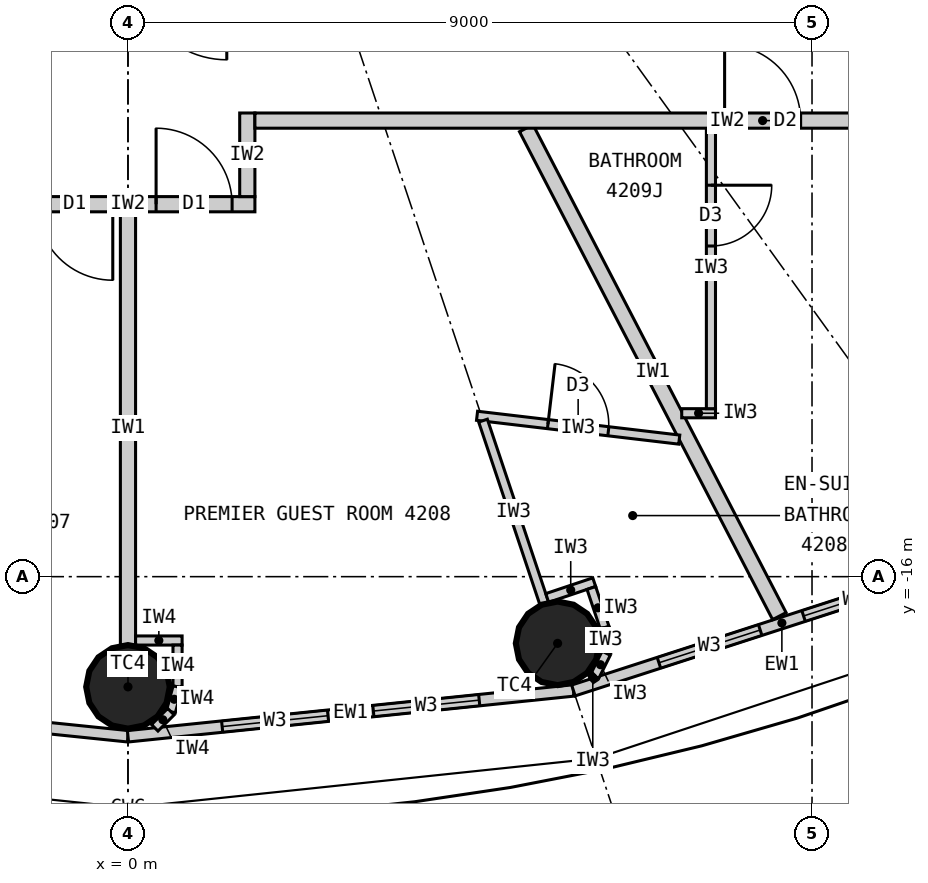
"""IFC4 building model, lengths in metres.
Left out: names, types, materials, properties, quantities, classifications, styles, units other than length and angle.
Written with IfcOpenShell. Run it as: python <this file> out.ifc"""

import sys

from ifc_helpers import new_model, si_unit, direction, frame, frame_2d, origin, origin_2d, place, context, subcontext, project, spatial, rectangle, circle, extrude, element, fill, save


model = new_model("IFC4")
c1 = context("Model", 3, precision=1e-05, world=origin(), true_north=direction((0.0, 1.0)))
c2 = subcontext(c1, "Body", "Model", "MODEL_VIEW")
j1 = project(units=[si_unit("LENGTHUNIT", "METRE"), si_unit("PLANEANGLEUNIT", "RADIAN")], contexts=[c1])
p1 = place(None, origin())
s1 = spatial("IfcSite", under=j1, at=p1, CompositionType="ELEMENT")
p2 = place(p1, origin())
s2 = spatial("IfcBuilding", under=s1, at=p2, CompositionType="ELEMENT")
p3 = place(p2, frame((0.0, 0.0, 159.9)))
s3 = spatial("IfcBuildingStorey", under=s2, at=p3, CompositionType="ELEMENT", Elevation=159.9)
for number, where, z_axis, x_axis in (
    (1, (0.0, -17.45, 0.0), (0.0, 0.0, 1.0), (1.0, 0.0, 0.0)),
    (2, (5.653, -16.877, 0.0), (0.0, 0.0, 1.0), (1.0, 0.0, 0.0)),
):
    element("IfcColumn", number, at=place(p3, frame(where, z_axis=z_axis, x_axis=x_axis)), inside=s3, PredefinedType="COLUMN", context=c2, shape_type="SweptSolid", body=[
        extrude(circle(Radius=0.55, at=origin_2d()), origin(), (0.0, 0.0, 1.0), 3.3),
    ])
p4 = place(p3, frame((-5.86, -17.497, 0.0), z_axis=(0.0, 0.0, 1.0), x_axis=(0.994751738032, -0.102318032045, 0.0)))
e3 = element("IfcWall", 3, at=p4, inside=s3, PredefinedType="ELEMENTEDWALL", context=c2, shape_type="SweptSolid", body=[
    extrude(rectangle(XDim=5.891, YDim=0.15, at=frame_2d((2.946, 0.0))), origin(), (0.0, 0.0, 1.0), 3.12),
])
p5 = place(p4, frame((1.246, 0.0, 0.9)))
e4 = element("IfcOpeningElement", 4, at=p5, cuts=e3, PredefinedType="OPENING", context=c2, shape_type="SweptSolid", body=[
    extrude(rectangle(XDim=1.4, YDim=1.9, at=frame_2d((0.7, 0.95))), frame((0.0, 0.085, 0.0), z_axis=(0.0, -1.0, 0.0), x_axis=(1.0, 0.0, 0.0)), (0.0, 0.0, 1.0), 0.17),
])
p6 = place(p4, frame((3.246, 0.0, 0.9)))
e5 = element("IfcOpeningElement", 5, at=p6, cuts=e3, PredefinedType="OPENING", context=c2, shape_type="SweptSolid", body=[
    extrude(rectangle(XDim=1.4, YDim=1.9, at=frame_2d((0.7, 0.95))), frame((0.0, 0.085, 0.0), z_axis=(0.0, -1.0, 0.0), x_axis=(1.0, 0.0, 0.0)), (0.0, 0.0, 1.0), 0.17),
])
p7 = place(p3, frame((0.0, -18.1, 0.0), z_axis=(0.0, 0.0, 1.0), x_axis=(0.994751738032, 0.102318032045, 0.0)))
e6 = element("IfcWall", 6, at=p7, inside=s3, PredefinedType="ELEMENTEDWALL", context=c2, shape_type="SweptSolid", body=[
    extrude(rectangle(XDim=5.891, YDim=0.15, at=frame_2d((2.946, 0.0))), origin(), (0.0, 0.0, 1.0), 3.12),
])
p8 = place(p7, frame((1.246, 0.0, 0.9)))
e7 = element("IfcOpeningElement", 7, at=p8, cuts=e6, PredefinedType="OPENING", context=c2, shape_type="SweptSolid", body=[
    extrude(rectangle(XDim=1.4, YDim=1.9, at=frame_2d((0.7, 0.95))), frame((0.0, 0.085, 0.0), z_axis=(0.0, -1.0, 0.0), x_axis=(1.0, 0.0, 0.0)), (0.0, 0.0, 1.0), 0.17),
])
p9 = place(p7, frame((3.246, 0.0, 0.9)))
e8 = element("IfcOpeningElement", 8, at=p9, cuts=e6, PredefinedType="OPENING", context=c2, shape_type="SweptSolid", body=[
    extrude(rectangle(XDim=1.4, YDim=1.9, at=frame_2d((0.7, 0.95))), frame((0.0, 0.085, 0.0), z_axis=(0.0, -1.0, 0.0), x_axis=(1.0, 0.0, 0.0)), (0.0, 0.0, 1.0), 0.17),
])
p10 = place(p3, frame((5.86, -17.497, 0.0), z_axis=(0.0, 0.0, 1.0), x_axis=(0.951432482129, 0.307857486429, 0.0)))
e9 = element("IfcWall", 9, at=p10, inside=s3, PredefinedType="ELEMENTEDWALL", context=c2, shape_type="SweptSolid", body=[
    extrude(rectangle(XDim=5.766, YDim=0.15, at=frame_2d((2.883, 0.0))), origin(), (0.0, 0.0, 1.0), 3.12),
])
p11 = place(p10, frame((1.183, 0.0, 0.9)))
e10 = element("IfcOpeningElement", 10, at=p11, cuts=e9, PredefinedType="OPENING", context=c2, shape_type="SweptSolid", body=[
    extrude(rectangle(XDim=1.4, YDim=1.9, at=frame_2d((0.7, 0.95))), frame((0.0, 0.085, 0.0), z_axis=(0.0, -1.0, 0.0), x_axis=(1.0, 0.0, 0.0)), (0.0, 0.0, 1.0), 0.17),
])
p12 = place(p10, frame((3.183, 0.0, 0.9)))
e11 = element("IfcOpeningElement", 11, at=p12, cuts=e9, PredefinedType="OPENING", context=c2, shape_type="SweptSolid", body=[
    extrude(rectangle(XDim=1.4, YDim=1.9, at=frame_2d((0.7, 0.95))), frame((0.0, 0.085, 0.0), z_axis=(0.0, -1.0, 0.0), x_axis=(1.0, 0.0, 0.0)), (0.0, 0.0, 1.0), 0.17),
])
p13 = place(p3, frame((0.0, -11.2, 0.0), z_axis=(0.0, 0.0, 1.0), x_axis=(0.0, -1.0, 0.0)))
e12 = element("IfcWall", 12, at=p13, inside=s3, PredefinedType="PARTITIONING", context=c2, shape_type="SweptSolid", body=[
    extrude(rectangle(XDim=5.7, YDim=0.2, at=frame_2d((2.85, 0.0))), origin(), (0.0, 0.0, 1.0), 2.42),
])
p14 = place(p3, frame((5.24, -10.1, 0.0), z_axis=(0.0, 0.0, 1.0), x_axis=(0.460532965373, -0.887642601391, 0.0)))
e13 = element("IfcWall", 13, at=p14, inside=s3, PredefinedType="PARTITIONING", context=c2, shape_type="SweptSolid", body=[
    extrude(rectangle(XDim=7.231, YDim=0.2, at=frame_2d((3.616, 0.0))), origin(), (0.0, 0.0, 1.0), 3.12),
])
p15 = place(p3, frame((1.67, -11.1, 0.0), z_axis=(0.0, 0.0, 1.0), x_axis=(-1.0, 0.0, 0.0)))
e14 = element("IfcWall", 14, at=p15, inside=s3, PredefinedType="PARTITIONING", context=c2, shape_type="SweptSolid", body=[
    extrude(rectangle(XDim=3.34, YDim=0.2, at=frame_2d((1.67, 0.0))), origin(), (0.0, 0.0, 1.0), 3.12),
])
p16 = place(p15, frame((1.87, 0.0, 0.0)))
e15 = element("IfcOpeningElement", 15, at=p16, cuts=e14, PredefinedType="OPENING", context=c2, shape_type="SweptSolid", body=[
    extrude(rectangle(XDim=1.0, YDim=2.2, at=frame_2d((0.5, 1.1))), frame((0.0, 0.11, 0.0), z_axis=(0.0, -1.0, 0.0), x_axis=(1.0, 0.0, 0.0)), (0.0, 0.0, 1.0), 0.22),
])
p17 = place(p15, frame((0.3, 0.0, 0.0)))
e16 = element("IfcOpeningElement", 16, at=p17, cuts=e14, PredefinedType="OPENING", context=c2, shape_type="SweptSolid", body=[
    extrude(rectangle(XDim=1.0, YDim=2.2, at=frame_2d((0.5, 1.1))), frame((0.0, 0.11, 0.0), z_axis=(0.0, -1.0, 0.0), x_axis=(1.0, 0.0, 0.0)), (0.0, 0.0, 1.0), 0.22),
])
p18 = place(p3, frame((1.57, -9.9, 0.0), z_axis=(0.0, 0.0, 1.0), x_axis=(0.0, -1.0, 0.0)))
e17 = element("IfcWall", 17, at=p18, inside=s3, PredefinedType="PARTITIONING", context=c2, shape_type="SweptSolid", body=[
    extrude(rectangle(XDim=1.1, YDim=0.2, at=frame_2d((0.55, 0.0))), origin(), (0.0, 0.0, 1.0), 3.12),
])
p19 = place(p3, frame((7.253, -14.197, 0.0), z_axis=(0.0, 0.0, 1.0), x_axis=(-0.993128188393, 0.117031625725, 0.0)))
e18 = element("IfcWall", 18, at=p19, inside=s3, PredefinedType="PARTITIONING", context=c2, shape_type="SweptSolid", body=[
    extrude(rectangle(XDim=2.678, YDim=0.12, at=frame_2d((1.339, 0.0))), origin(), (0.0, 0.0, 1.0), 3.12),
])
p20 = place(p19, frame((0.939, 0.0, 0.0)))
e19 = element("IfcOpeningElement", 19, at=p20, cuts=e18, PredefinedType="OPENING", context=c2, shape_type="SweptSolid", body=[
    extrude(rectangle(XDim=0.8, YDim=2.1, at=frame_2d((0.4, 1.05))), frame((0.0, 0.07, 0.0), z_axis=(0.0, -1.0, 0.0), x_axis=(1.0, 0.0, 0.0)), (0.0, 0.0, 1.0), 0.14),
])
p21 = place(p3, frame((4.671, -13.948, 0.0), z_axis=(0.0, 0.0, 1.0), x_axis=(0.317669167093, -0.948201613729, 0.0)))
e20 = element("IfcWall", 20, at=p21, inside=s3, PredefinedType="PARTITIONING", context=c2, shape_type="SweptSolid", body=[
    extrude(rectangle(XDim=2.54, YDim=0.12, at=frame_2d((1.27, 0.0))), origin(), (0.0, 0.0, 1.0), 2.42),
])
p22 = place(p3, frame((5.516, -16.28, 0.0), z_axis=(0.0, 0.0, 1.0), x_axis=(0.948157944392, 0.317799484717, 0.0)))
e21 = element("IfcWall", 21, at=p22, inside=s3, PredefinedType="PARTITIONING", context=c2, shape_type="SweptSolid", body=[
    extrude(rectangle(XDim=0.652, YDim=0.12, at=frame_2d((0.326, 0.0))), origin(), (0.0, 0.0, 1.0), 3.12),
])
p23 = place(p3, frame((6.097, -16.149, 0.0), z_axis=(0.0, 0.0, 1.0), x_axis=(0.317292604854, -0.948327687514, 0.0)))
e22 = element("IfcWall", 22, at=p23, inside=s3, PredefinedType="PARTITIONING", context=c2, shape_type="SweptSolid", body=[
    extrude(rectangle(XDim=0.55, YDim=0.12, at=frame_2d((0.275, 0.0))), origin(), (0.0, 0.0, 1.0), 3.12),
])
for number, where, z_axis, x_axis in (
    (23, (6.271, -16.67, 0.0), (0.0, 0.0, 1.0), (0.061, -0.998, 0.0)),
    (24, (6.292, -17.007, 0.0), (0.0, 0.0, 1.0), (-0.445, -0.895, 0.0)),
):
    element("IfcWall", number, at=place(p3, frame(where, z_axis=z_axis, x_axis=x_axis)), inside=s3, PredefinedType="PARTITIONING", context=c2, shape_type="SweptSolid", body=[
        extrude(rectangle(XDim=0.338, YDim=0.12, at=frame_2d((0.169, 0.0))), origin(), (0.0, 0.0, 1.0), 3.12),
    ])
p24 = place(p3, frame((6.142, -17.31, 0.0), z_axis=(0.0, 0.0, 1.0), x_axis=(-0.835039693181, -0.550189704386, 0.0)))
e25 = element("IfcWall", 25, at=p24, inside=s3, PredefinedType="PARTITIONING", context=c2, shape_type="SweptSolid", body=[
    extrude(rectangle(XDim=0.062, YDim=0.12, at=frame_2d((0.031, 0.0))), origin(), (0.0, 0.0, 1.0), 3.12),
])
p25 = place(p3, frame((7.286, -13.85, 0.0), z_axis=(0.0, 0.0, 1.0), x_axis=(1.0, 0.0, 0.0)))
e26 = element("IfcWall", 26, at=p25, inside=s3, PredefinedType="PARTITIONING", context=c2, shape_type="SweptSolid", body=[
    extrude(rectangle(XDim=0.444, YDim=0.12, at=frame_2d((0.222, 0.0))), origin(), (0.0, 0.0, 1.0), 3.12),
])
p26 = place(p3, frame((7.67, -10.1, 0.0), z_axis=(0.0, 0.0, 1.0), x_axis=(0.0, -1.0, 0.0)))
e27 = element("IfcWall", 27, at=p26, inside=s3, PredefinedType="PARTITIONING", context=c2, shape_type="SweptSolid", body=[
    extrude(rectangle(XDim=3.69, YDim=0.12, at=frame_2d((1.845, 0.0))), origin(), (0.0, 0.0, 1.0), 3.12),
])
p27 = place(p26, frame((0.75, 0.0, 0.0)))
e28 = element("IfcOpeningElement", 28, at=p27, cuts=e27, PredefinedType="OPENING", context=c2, shape_type="SweptSolid", body=[
    extrude(rectangle(XDim=0.8, YDim=2.1, at=frame_2d((0.4, 1.05))), frame((0.0, 0.07, 0.0), z_axis=(0.0, -1.0, 0.0), x_axis=(1.0, 0.0, 0.0)), (0.0, 0.0, 1.0), 0.14),
])
p28 = place(p3, frame((14.1, -10.0, 0.0), z_axis=(0.0, 0.0, 1.0), x_axis=(-1.0, 0.0, 0.0)))
e29 = element("IfcWall", 29, at=p28, inside=s3, PredefinedType="PARTITIONING", context=c2, shape_type="SweptSolid", body=[
    extrude(rectangle(XDim=12.43, YDim=0.2, at=frame_2d((6.215, 0.0))), origin(), (0.0, 0.0, 1.0), 3.12),
])
p29 = place(p28, frame((5.25, 0.0, 0.0)))
e30 = element("IfcOpeningElement", 30, at=p29, cuts=e29, PredefinedType="OPENING", context=c2, shape_type="SweptSolid", body=[
    extrude(rectangle(XDim=1.0, YDim=2.2, at=frame_2d((0.5, 1.1))), frame((0.0, 0.11, 0.0), z_axis=(0.0, -1.0, 0.0), x_axis=(1.0, 0.0, 0.0)), (0.0, 0.0, 1.0), 0.22),
])
p30 = place(p3, frame((0.1, -16.84, 0.0), z_axis=(0.0, 0.0, 1.0), x_axis=(1.0, 0.0, 0.0)))
e31 = element("IfcWall", 31, at=p30, inside=s3, PredefinedType="PARTITIONING", context=c2, shape_type="SweptSolid", body=[
    extrude(rectangle(XDim=0.612, YDim=0.12, at=frame_2d((0.306, 0.0))), origin(), (0.0, 0.0, 1.0), 3.12),
])
p31 = place(p3, frame((0.652, -16.9, 0.0), z_axis=(0.0, 0.0, 1.0), x_axis=(0.0, -1.0, 0.0)))
e32 = element("IfcWall", 32, at=p31, inside=s3, PredefinedType="PARTITIONING", context=c2, shape_type="SweptSolid", body=[
    extrude(rectangle(XDim=0.55, YDim=0.12, at=frame_2d((0.275, 0.0))), origin(), (0.0, 0.0, 1.0), 3.12),
])
p32 = place(p3, frame((0.652, -17.45, 0.0), z_axis=(0.0, 0.0, 1.0), x_axis=(-0.258832454679, -0.965922233104, 0.0)))
e33 = element("IfcWall", 33, at=p32, inside=s3, PredefinedType="PARTITIONING", context=c2, shape_type="SweptSolid", body=[
    extrude(rectangle(XDim=0.338, YDim=0.12, at=frame_2d((0.169, 0.0))), origin(), (0.0, 0.0, 1.0), 3.12),
])
p33 = place(p3, frame((0.565, -17.776, 0.0), z_axis=(0.0, 0.0, 1.0), x_axis=(-0.707106781187, -0.707106781187, 0.0)))
e34 = element("IfcWall", 34, at=p33, inside=s3, PredefinedType="PARTITIONING", context=c2, shape_type="SweptSolid", body=[
    extrude(rectangle(XDim=0.301, YDim=0.12, at=frame_2d((0.15, 0.0))), origin(), (0.0, 0.0, 1.0), 3.12),
])
p34 = place(p8, origin())
e35 = element("IfcWindow", 35, at=p34, inside=s3, PartitioningType="SINGLE_PANEL", PredefinedType="WINDOW", context=c2, shape_type="SweptSolid", body=[
    extrude(rectangle(XDim=1.4, YDim=1.9, at=frame_2d((0.7, 0.95))), frame((0.0, 0.03, 0.0), z_axis=(0.0, -1.0, 0.0), x_axis=(1.0, 0.0, 0.0)), (0.0, 0.0, 1.0), 0.06),
])
fill(e7, e35)
p35 = place(p9, origin())
e36 = element("IfcWindow", 36, at=p35, inside=s3, PartitioningType="SINGLE_PANEL", PredefinedType="WINDOW", context=c2, shape_type="SweptSolid", body=[
    extrude(rectangle(XDim=1.4, YDim=1.9, at=frame_2d((0.7, 0.95))), frame((0.0, 0.03, 0.0), z_axis=(0.0, -1.0, 0.0), x_axis=(1.0, 0.0, 0.0)), (0.0, 0.0, 1.0), 0.06),
])
fill(e8, e36)
p36 = place(p11, origin())
e37 = element("IfcWindow", 37, at=p36, inside=s3, PartitioningType="SINGLE_PANEL", PredefinedType="WINDOW", context=c2, shape_type="SweptSolid", body=[
    extrude(rectangle(XDim=1.4, YDim=1.9, at=frame_2d((0.7, 0.95))), frame((0.0, 0.03, 0.0), z_axis=(0.0, -1.0, 0.0), x_axis=(1.0, 0.0, 0.0)), (0.0, 0.0, 1.0), 0.06),
])
fill(e10, e37)
p37 = place(p12, origin())
e38 = element("IfcWindow", 38, at=p37, inside=s3, PartitioningType="SINGLE_PANEL", PredefinedType="WINDOW", context=c2, shape_type="SweptSolid", body=[
    extrude(rectangle(XDim=1.4, YDim=1.9, at=frame_2d((0.7, 0.95))), frame((0.0, 0.03, 0.0), z_axis=(0.0, -1.0, 0.0), x_axis=(1.0, 0.0, 0.0)), (0.0, 0.0, 1.0), 0.06),
])
fill(e11, e38)
p38 = place(p16, origin())
e39 = element("IfcDoor", 39, at=p38, inside=s3, OperationType="SINGLE_SWING_LEFT", PredefinedType="DOOR", context=c2, shape_type="SweptSolid", body=[
    extrude(rectangle(XDim=1.0, YDim=2.2, at=frame_2d((0.5, 1.1))), frame((0.0, 0.025, 0.0), z_axis=(0.0, -1.0, 0.0), x_axis=(1.0, 0.0, 0.0)), (0.0, 0.0, 1.0), 0.05),
])
fill(e15, e39)
p39 = place(p20, origin())
e40 = element("IfcDoor", 40, at=p39, inside=s3, OperationType="SINGLE_SWING_RIGHT", PredefinedType="DOOR", context=c2, shape_type="SweptSolid", body=[
    extrude(rectangle(XDim=0.8, YDim=2.1, at=frame_2d((0.4, 1.05))), frame((0.0, 0.025, 0.0), z_axis=(0.0, -1.0, 0.0), x_axis=(1.0, 0.0, 0.0)), (0.0, 0.0, 1.0), 0.05),
])
fill(e19, e40)
p40 = place(p17, origin())
e41 = element("IfcDoor", 41, at=p40, inside=s3, OperationType="SINGLE_SWING_RIGHT", PredefinedType="DOOR", context=c2, shape_type="SweptSolid", body=[
    extrude(rectangle(XDim=1.0, YDim=2.2, at=frame_2d((0.5, 1.1))), frame((0.0, 0.025, 0.0), z_axis=(0.0, -1.0, 0.0), x_axis=(1.0, 0.0, 0.0)), (0.0, 0.0, 1.0), 0.05),
])
fill(e16, e41)
p41 = place(p27, origin())
e42 = element("IfcDoor", 42, at=p41, inside=s3, OperationType="SINGLE_SWING_LEFT", PredefinedType="DOOR", context=c2, shape_type="SweptSolid", body=[
    extrude(rectangle(XDim=0.8, YDim=2.1, at=frame_2d((0.4, 1.05))), frame((0.0, 0.025, 0.0), z_axis=(0.0, -1.0, 0.0), x_axis=(1.0, 0.0, 0.0)), (0.0, 0.0, 1.0), 0.05),
])
fill(e28, e42)
p42 = place(p29, origin())
e43 = element("IfcDoor", 43, at=p42, inside=s3, OperationType="SINGLE_SWING_RIGHT", PredefinedType="DOOR", context=c2, shape_type="SweptSolid", body=[
    extrude(rectangle(XDim=1.0, YDim=2.2, at=frame_2d((0.5, 1.1))), frame((0.0, 0.025, 0.0), z_axis=(0.0, -1.0, 0.0), x_axis=(1.0, 0.0, 0.0)), (0.0, 0.0, 1.0), 0.05),
])
fill(e30, e43)
save(model, sys.argv[1])
